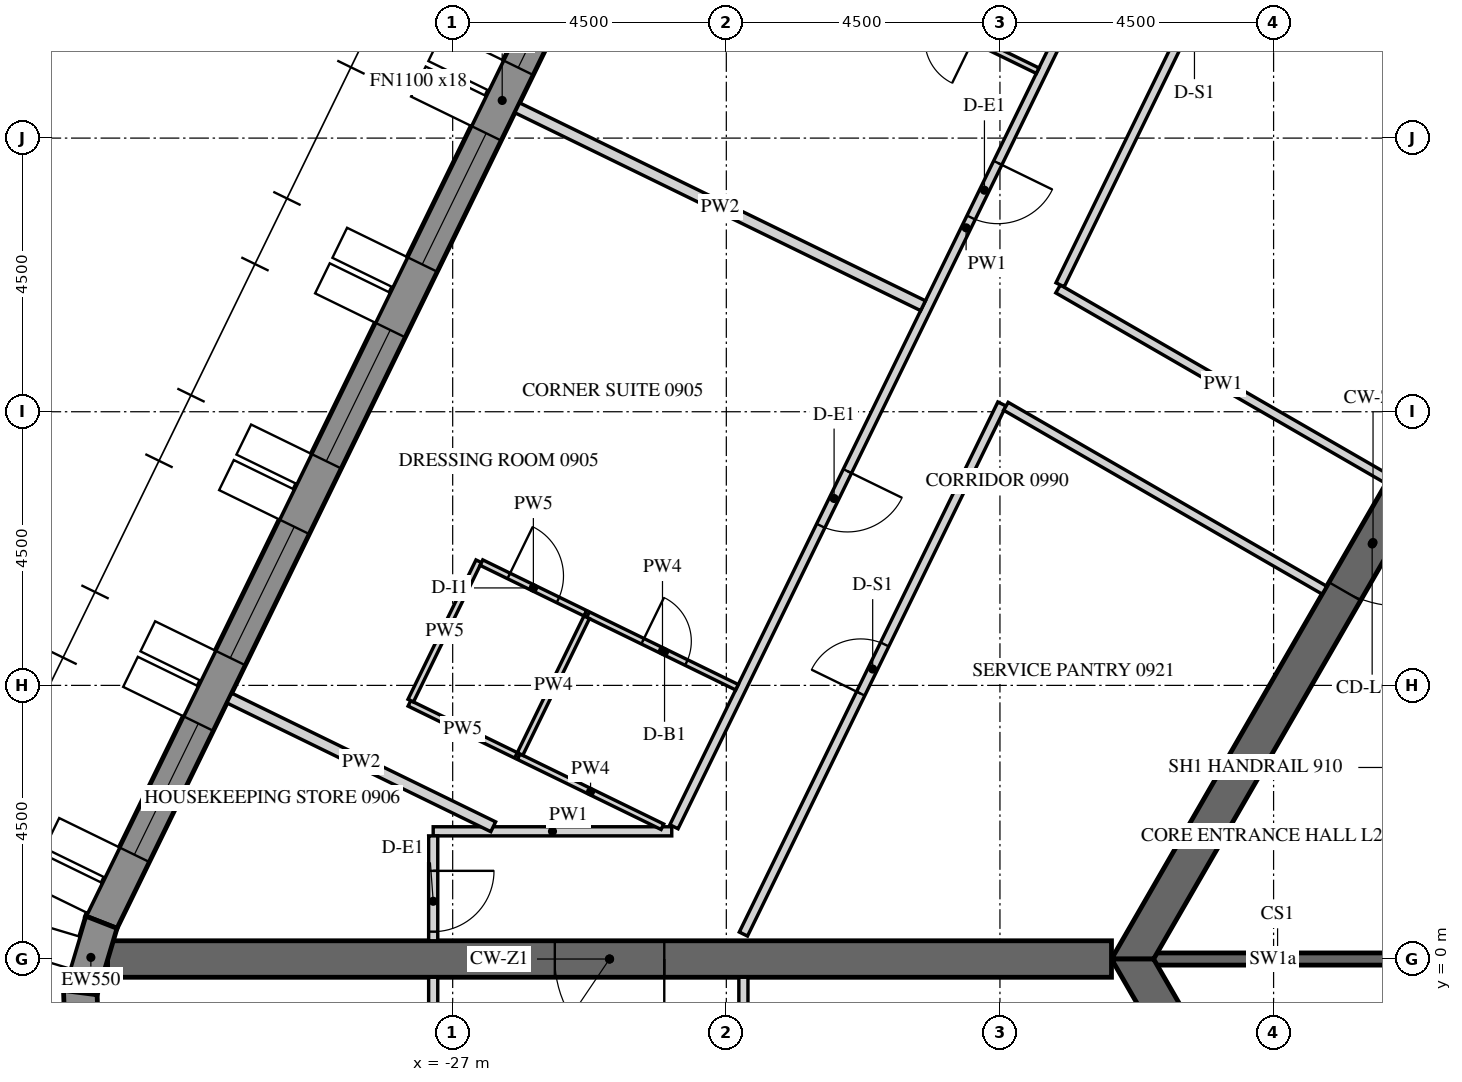
"""IFC4 building model, lengths in metres.
Left out: names, types, materials, properties, quantities, classifications, styles, units other than length and angle.
Written with IfcOpenShell. Run it as: python <this file> out.ifc"""

import sys

from ifc_helpers import new_model, si_unit, direction, frame, frame_2d, origin, place, context, subcontext, project, spatial, polyline, rectangle, outline, extrude, element, fill, save


model = new_model("IFC4")
c1 = context("Model", 3, precision=1e-05, world=origin(), true_north=direction((0.0, 1.0)))
c2 = subcontext(c1, "Body", "Model", "MODEL_VIEW")
j1 = project(units=[si_unit("LENGTHUNIT", "METRE"), si_unit("PLANEANGLEUNIT", "RADIAN")], contexts=[c1])
p1 = place(None, origin())
s1 = spatial("IfcSite", under=j1, at=p1, CompositionType="ELEMENT")
p2 = place(p1, origin())
s2 = spatial("IfcBuilding", under=s1, at=p2, CompositionType="ELEMENT")
p3 = place(p2, frame((0.0, 0.0, 123.3)))
s3 = spatial("IfcBuildingStorey", under=s2, at=p3, CompositionType="ELEMENT", Elevation=123.3)
p4 = place(p3, frame((-19.595, 27.633, -0.15), z_axis=(0.0, 0.0, 1.0), x_axis=(-0.438368285794, -0.898795441694, 0.0)))
e1 = element("IfcWall", 1, at=p4, inside=s3, PredefinedType="SOLIDWALL", context=c2, shape_type="SweptSolid", body=[
    extrude(outline(polyline([(-0.026, -0.275), (30.093, -0.275), (30.048, 0.275), (0.026, 0.275), (-0.026, -0.275)])), origin(), (0.0, 0.0, 1.0), 3.9),
])
p5 = place(p4, frame((1.236, 0.0, 1.05)))
e2 = element("IfcOpeningElement", 2, at=p5, cuts=e1, PredefinedType="OPENING", context=c2, shape_type="SweptSolid", body=[
    extrude(rectangle(XDim=2.4, YDim=2.4, at=frame_2d((1.2, 1.2))), frame((0.0, 0.285, 0.0), z_axis=(0.0, -1.0, 0.0), x_axis=(1.0, 0.0, 0.0)), (0.0, 0.0, 1.0), 0.57),
])
p6 = place(p4, frame((4.835, 0.0, 1.05)))
e3 = element("IfcOpeningElement", 3, at=p6, cuts=e1, PredefinedType="OPENING", context=c2, shape_type="SweptSolid", body=[
    extrude(rectangle(XDim=2.4, YDim=2.4, at=frame_2d((1.2, 1.2))), frame((0.0, 0.285, 0.0), z_axis=(0.0, -1.0, 0.0), x_axis=(1.0, 0.0, 0.0)), (0.0, 0.0, 1.0), 0.57),
])
p7 = place(p4, frame((8.436, 0.0, 1.05)))
e4 = element("IfcOpeningElement", 4, at=p7, cuts=e1, PredefinedType="OPENING", context=c2, shape_type="SweptSolid", body=[
    extrude(rectangle(XDim=2.4, YDim=2.4, at=frame_2d((1.2, 1.2))), frame((0.0, 0.285, 0.0), z_axis=(0.0, -1.0, 0.0), x_axis=(1.0, 0.0, 0.0)), (0.0, 0.0, 1.0), 0.57),
])
p8 = place(p4, frame((12.035, 0.0, 1.05)))
e5 = element("IfcOpeningElement", 5, at=p8, cuts=e1, PredefinedType="OPENING", context=c2, shape_type="SweptSolid", body=[
    extrude(rectangle(XDim=2.4, YDim=2.4, at=frame_2d((1.2, 1.2))), frame((0.0, 0.285, 0.0), z_axis=(0.0, -1.0, 0.0), x_axis=(1.0, 0.0, 0.0)), (0.0, 0.0, 1.0), 0.57),
])
p9 = place(p4, frame((15.635, 0.0, 1.05)))
e6 = element("IfcOpeningElement", 6, at=p9, cuts=e1, PredefinedType="OPENING", context=c2, shape_type="SweptSolid", body=[
    extrude(rectangle(XDim=2.4, YDim=2.4, at=frame_2d((1.2, 1.2))), frame((0.0, 0.285, 0.0), z_axis=(0.0, -1.0, 0.0), x_axis=(1.0, 0.0, 0.0)), (0.0, 0.0, 1.0), 0.57),
])
p10 = place(p4, frame((19.236, 0.0, 1.05)))
e7 = element("IfcOpeningElement", 7, at=p10, cuts=e1, PredefinedType="OPENING", context=c2, shape_type="SweptSolid", body=[
    extrude(rectangle(XDim=2.4, YDim=2.4, at=frame_2d((1.2, 1.2))), frame((0.0, 0.285, 0.0), z_axis=(0.0, -1.0, 0.0), x_axis=(1.0, 0.0, 0.0)), (0.0, 0.0, 1.0), 0.57),
])
p11 = place(p4, frame((22.835, 0.0, 1.05)))
e8 = element("IfcOpeningElement", 8, at=p11, cuts=e1, PredefinedType="OPENING", context=c2, shape_type="SweptSolid", body=[
    extrude(rectangle(XDim=2.4, YDim=2.4, at=frame_2d((1.2, 1.2))), frame((0.0, 0.285, 0.0), z_axis=(0.0, -1.0, 0.0), x_axis=(1.0, 0.0, 0.0)), (0.0, 0.0, 1.0), 0.57),
])
p12 = place(p4, frame((26.436, 0.0, 1.05)))
e9 = element("IfcOpeningElement", 9, at=p12, cuts=e1, PredefinedType="OPENING", context=c2, shape_type="SweptSolid", body=[
    extrude(rectangle(XDim=2.4, YDim=2.4, at=frame_2d((1.2, 1.2))), frame((0.0, 0.285, 0.0), z_axis=(0.0, -1.0, 0.0), x_axis=(1.0, 0.0, 0.0)), (0.0, 0.0, 1.0), 0.57),
])
p13 = place(p3, frame((-32.777, 0.605, -0.15), z_axis=(0.0, 0.0, 1.0), x_axis=(-0.286921497463, -0.957954098219, 0.0)))
e10 = element("IfcWall", 10, at=p13, inside=s3, PredefinedType="SOLIDWALL", context=c2, shape_type="SweptSolid", body=[
    extrude(outline(polyline([(-0.022, -0.275), (1.253, -0.275), (1.163, 0.275), (0.022, 0.275), (-0.022, -0.275)])), origin(), (0.0, 0.0, 1.0), 3.9),
])
p14 = place(p3, frame((-33.124, -0.552, -0.15), z_axis=(0.0, 0.0, 1.0), x_axis=(0.03495638276, -0.999388838893, 0.0)))
e11 = element("IfcWall", 11, at=p14, inside=s3, PredefinedType="SOLIDWALL", context=c2, shape_type="SweptSolid", body=[
    extrude(outline(polyline([(-0.045, -0.275), (1.253, -0.275), (1.163, 0.275), (0.045, 0.275), (-0.045, -0.275)])), origin(), (0.0, 0.0, 1.0), 3.9),
])
p15 = place(p3, frame((-7.91, 13.7, -0.15), z_axis=(0.0, 0.0, 1.0), x_axis=(-0.499999880136, -0.866025472988, 0.0)))
e12 = element("IfcWall", 12, at=p15, inside=s3, PredefinedType="SHEAR", context=c2, shape_type="SweptSolid", body=[
    extrude(outline(polyline([(-0.173, -0.3), (15.993, -0.3), (15.646, 0.3), (0.173, 0.3), (-0.173, -0.3)])), origin(), (0.0, 0.0, 1.0), 3.9),
])
p16 = place(p15, frame((7.039, 0.0, 0.15)))
e13 = element("IfcOpeningElement", 13, at=p16, cuts=e12, PredefinedType="OPENING", context=c2, shape_type="SweptSolid", body=[
    extrude(rectangle(XDim=1.8, YDim=2.4, at=frame_2d((0.9, 1.2))), frame((0.0, 0.31, 0.0), z_axis=(0.0, -1.0, 0.0), x_axis=(1.0, 0.0, 0.0)), (0.0, 0.0, 1.0), 0.62),
])
p17 = place(p3, frame((-15.819, 0.0, -0.15), z_axis=(0.0, 0.0, 1.0), x_axis=(0.499999880136, -0.866025472988, 0.0)))
e14 = element("IfcWall", 14, at=p17, inside=s3, PredefinedType="SHEAR", context=c2, shape_type="SweptSolid", body=[
    extrude(outline(polyline([(-0.173, -0.3), (15.993, -0.3), (15.646, 0.3), (0.173, 0.3), (-0.173, -0.3)])), origin(), (0.0, 0.0, 1.0), 3.9),
])
p18 = place(p17, frame((6.981, 0.0, 0.15)))
e15 = element("IfcOpeningElement", 15, at=p18, cuts=e14, PredefinedType="OPENING", context=c2, shape_type="SweptSolid", body=[
    extrude(rectangle(XDim=1.8, YDim=2.4, at=frame_2d((0.9, 1.2))), frame((0.0, 0.31, 0.0), z_axis=(0.0, -1.0, 0.0), x_axis=(1.0, 0.0, 0.0)), (0.0, 0.0, 1.0), 0.62),
])
p19 = place(p3, frame((-16.166, 0.0, -0.15), z_axis=(0.0, 0.0, 1.0), x_axis=(-1.0, 0.0, 0.0)))
e16 = element("IfcWall", 16, at=p19, inside=s3, PredefinedType="SHEAR", context=c2, shape_type="SweptSolid", body=[
    extrude(rectangle(XDim=16.509, YDim=0.6, at=frame_2d((8.254, 0.0))), origin(), (0.0, 0.0, 1.0), 3.9),
])
p20 = place(p19, frame((7.354, 0.0, 0.15)))
e17 = element("IfcOpeningElement", 17, at=p20, cuts=e16, PredefinedType="OPENING", context=c2, shape_type="SweptSolid", body=[
    extrude(rectangle(XDim=1.8, YDim=2.4, at=frame_2d((0.9, 1.2))), frame((0.0, 0.31, 0.0), z_axis=(0.0, -1.0, 0.0), x_axis=(1.0, 0.0, 0.0)), (0.0, 0.0, 1.0), 0.62),
])
p21 = place(p3, frame((-11.547, 0.0, -0.15), z_axis=(0.0, 0.0, 1.0), x_axis=(-1.0, 0.0, 0.0)))
e18 = element("IfcWall", 18, at=p21, inside=s3, PredefinedType="SHEAR", context=c2, shape_type="SweptSolid", body=[
    extrude(rectangle(XDim=3.926, YDim=0.2, at=frame_2d((1.963, 0.0))), origin(), (0.0, 0.0, 1.0), 3.9),
])
p22 = place(p3, frame((-13.752, 21.875, 0.0), z_axis=(0.0, 0.0, 1.0), x_axis=(-0.438374473378, -0.898792423806, 0.0)))
e19 = element("IfcWall", 19, at=p22, inside=s3, PredefinedType="PARTITIONING", context=c2, shape_type="SweptSolid", body=[
    extrude(rectangle(XDim=21.918, YDim=0.15, at=frame_2d((10.959, 0.0))), origin(), (0.0, 0.0, 1.0), 2.988),
])
p23 = place(p22, frame((9.771, 0.0, 0.0)))
e20 = element("IfcOpeningElement", 20, at=p23, cuts=e19, PredefinedType="OPENING", context=c2, shape_type="SweptSolid", body=[
    extrude(rectangle(XDim=1.0, YDim=2.1, at=frame_2d((0.5, 1.05))), frame((0.0, 0.085, 0.0), z_axis=(0.0, -1.0, 0.0), x_axis=(1.0, 0.0, 0.0)), (0.0, 0.0, 1.0), 0.17),
])
p24 = place(p22, frame((15.412, 0.0, 0.0)))
e21 = element("IfcOpeningElement", 21, at=p24, cuts=e19, PredefinedType="OPENING", context=c2, shape_type="SweptSolid", body=[
    extrude(rectangle(XDim=1.0, YDim=2.1, at=frame_2d((0.5, 1.05))), frame((0.0, 0.085, 0.0), z_axis=(0.0, -1.0, 0.0), x_axis=(1.0, 0.0, 0.0)), (0.0, 0.0, 1.0), 0.17),
])
p25 = place(p3, frame((-23.397, 2.1, 0.0), z_axis=(0.0, 0.0, 1.0), x_axis=(-1.0, 0.0, 0.0)))
e22 = element("IfcWall", 22, at=p25, inside=s3, PredefinedType="PARTITIONING", context=c2, shape_type="SweptSolid", body=[
    extrude(rectangle(XDim=3.923, YDim=0.15, at=frame_2d((1.961, 0.0))), origin(), (0.0, 0.0, 1.0), 2.988),
])
p26 = place(p3, frame((-27.32, 2.025, 0.0), z_axis=(0.0, 0.0, 1.0), x_axis=(0.0, -1.0, 0.0)))
e23 = element("IfcWall", 23, at=p26, inside=s3, PredefinedType="PARTITIONING", context=c2, shape_type="SweptSolid", body=[
    extrude(rectangle(XDim=1.725, YDim=0.15, at=frame_2d((0.862, 0.0))), origin(), (0.0, 0.0, 1.0), 2.988),
])
p27 = place(p26, frame((0.575, 0.0, 0.0)))
e24 = element("IfcOpeningElement", 24, at=p27, cuts=e23, PredefinedType="OPENING", context=c2, shape_type="SweptSolid", body=[
    extrude(rectangle(XDim=1.0, YDim=2.1, at=frame_2d((0.5, 1.05))), frame((0.0, 0.085, 0.0), z_axis=(0.0, -1.0, 0.0), x_axis=(1.0, 0.0, 0.0)), (0.0, 0.0, 1.0), 0.17),
])
p28 = place(p3, frame((-11.614, 7.884, 0.0), z_axis=(0.0, 0.0, 1.0), x_axis=(-0.866025438137, 0.4999999405, 0.0)))
e25 = element("IfcWall", 25, at=p28, inside=s3, PredefinedType="PARTITIONING", context=c2, shape_type="SweptSolid", body=[
    extrude(rectangle(XDim=6.271, YDim=0.15, at=frame_2d((3.135, 0.0))), origin(), (0.0, 0.0, 1.0), 2.988),
])
p29 = place(p3, frame((-17.011, 11.087, 0.0), z_axis=(0.0, 0.0, 1.0), x_axis=(0.43836877185, 0.898795204631, 0.0)))
e26 = element("IfcWall", 26, at=p29, inside=s3, PredefinedType="PARTITIONING", context=c2, shape_type="SweptSolid", body=[
    extrude(rectangle(XDim=10.083, YDim=0.15, at=frame_2d((5.042, 0.0))), origin(), (0.0, 0.0, 1.0), 2.988),
])
p30 = place(p29, frame((4.592, 0.0, 0.0)))
e27 = element("IfcOpeningElement", 27, at=p30, cuts=e26, PredefinedType="OPENING", context=c2, shape_type="SweptSolid", body=[
    extrude(rectangle(XDim=0.9, YDim=2.1, at=frame_2d((0.45, 1.05))), frame((0.0, 0.085, 0.0), z_axis=(0.0, -1.0, 0.0), x_axis=(1.0, 0.0, 0.0)), (0.0, 0.0, 1.0), 0.17),
])
p31 = place(p3, frame((-22.219, 0.41, 0.0), z_axis=(0.0, 0.0, 1.0), x_axis=(0.438391891827, 0.898783927972, 0.0)))
e28 = element("IfcWall", 28, at=p31, inside=s3, PredefinedType="PARTITIONING", context=c2, shape_type="SweptSolid", body=[
    extrude(rectangle(XDim=9.699, YDim=0.15, at=frame_2d((4.85, 0.0))), origin(), (0.0, 0.0, 1.0), 2.988),
])
p32 = place(p31, frame((4.4, 0.0, 0.0)))
e29 = element("IfcOpeningElement", 29, at=p32, cuts=e28, PredefinedType="OPENING", context=c2, shape_type="SweptSolid", body=[
    extrude(rectangle(XDim=0.9, YDim=2.1, at=frame_2d((0.45, 1.05))), frame((0.0, 0.085, 0.0), z_axis=(0.0, -1.0, 0.0), x_axis=(1.0, 0.0, 0.0)), (0.0, 0.0, 1.0), 0.17),
])
p33 = place(p3, frame((-17.902, 9.09, 0.0), z_axis=(0.0, 0.0, 1.0), x_axis=(0.866036368755, -0.499981007633, 0.0)))
e30 = element("IfcWall", 30, at=p33, inside=s3, PredefinedType="PARTITIONING", context=c2, shape_type="SweptSolid", body=[
    extrude(rectangle(XDim=6.049, YDim=0.15, at=frame_2d((3.024, 0.0))), origin(), (0.0, 0.0, 1.0), 2.988),
])
p34 = place(p3, frame((-27.32, -0.3, 0.0), z_axis=(0.0, 0.0, 1.0), x_axis=(0.0, -1.0, 0.0)))
e31 = element("IfcWall", 31, at=p34, inside=s3, PredefinedType="PARTITIONING", context=c2, shape_type="SweptSolid", body=[
    extrude(rectangle(XDim=1.8, YDim=0.15, at=frame_2d((0.9, 0.0))), origin(), (0.0, 0.0, 1.0), 2.988),
])
p35 = place(p3, frame((-22.219, -1.666, 0.0), z_axis=(0.0, 0.0, 1.0), x_axis=(0.0, 1.0, 0.0)))
e32 = element("IfcWall", 32, at=p35, inside=s3, PredefinedType="PARTITIONING", context=c2, shape_type="SweptSolid", body=[
    extrude(rectangle(XDim=1.366, YDim=0.15, at=frame_2d((0.683, 0.0))), origin(), (0.0, 0.0, 1.0), 2.988),
])
p36 = place(p3, frame((-17.38, 14.608, 0.0), z_axis=(0.0, 0.0, 1.0), x_axis=(-0.898790906006, 0.438377585285, 0.0)))
e33 = element("IfcWall", 33, at=p36, inside=s3, PredefinedType="PARTITIONING", context=c2, shape_type="SweptSolid", body=[
    extrude(rectangle(XDim=2.925, YDim=0.1, at=frame_2d((1.462, 0.0))), origin(), (0.0, 0.0, 1.0), 2.988),
])
p37 = place(p36, frame((1.175, 0.0, 0.0)))
e34 = element("IfcOpeningElement", 34, at=p37, cuts=e33, PredefinedType="OPENING", context=c2, shape_type="SweptSolid", body=[
    extrude(rectangle(XDim=0.8, YDim=2.1, at=frame_2d((0.4, 1.05))), frame((0.0, 0.06, 0.0), z_axis=(0.0, -1.0, 0.0), x_axis=(1.0, 0.0, 0.0)), (0.0, 0.0, 1.0), 0.12),
])
p38 = place(p3, frame((-25.938, 13.999, 0.0), z_axis=(0.0, 0.0, 1.0), x_axis=(0.898789933843, -0.438379578473, 0.0)))
e35 = element("IfcWall", 35, at=p38, inside=s3, PredefinedType="PARTITIONING", context=c2, shape_type="SweptSolid", body=[
    extrude(rectangle(XDim=7.425, YDim=0.18, at=frame_2d((3.712, 0.0))), origin(), (0.0, 0.0, 1.0), 2.988),
])
p39 = place(p3, frame((-23.551, 2.175, 0.0), z_axis=(0.0, 0.0, 1.0), x_axis=(-0.898821988063, 0.438313853049, 0.0)))
e36 = element("IfcWall", 36, at=p39, inside=s3, PredefinedType="PARTITIONING", context=c2, shape_type="SweptSolid", body=[
    extrude(rectangle(XDim=2.629, YDim=0.1, at=frame_2d((1.314, 0.0))), origin(), (0.0, 0.0, 1.0), 2.988),
])
p40 = place(p3, frame((-24.774, 5.664, 0.0), z_axis=(0.0, 0.0, 1.0), x_axis=(0.898791692788, -0.43837597217, 0.0)))
e37 = element("IfcWall", 37, at=p40, inside=s3, PredefinedType="PARTITIONING", context=c2, shape_type="SweptSolid", body=[
    extrude(rectangle(XDim=2.725, YDim=0.1, at=frame_2d((1.363, 0.0))), origin(), (0.0, 0.0, 1.0), 2.988),
])
p41 = place(p40, frame((1.0, 0.0, 0.0)))
e38 = element("IfcOpeningElement", 38, at=p41, cuts=e37, PredefinedType="OPENING", context=c2, shape_type="SweptSolid", body=[
    extrude(rectangle(XDim=0.8, YDim=2.1, at=frame_2d((0.4, 1.05))), frame((0.0, 0.06, 0.0), z_axis=(0.0, -1.0, 0.0), x_axis=(1.0, 0.0, 0.0)), (0.0, 0.0, 1.0), 0.12),
])
p42 = place(p3, frame((-25.959, 3.349, 0.0), z_axis=(0.0, 0.0, 1.0), x_axis=(-0.898815368173, 0.438327427772, 0.0)))
e39 = element("IfcWall", 39, at=p42, inside=s3, PredefinedType="PARTITIONING", context=c2, shape_type="SweptSolid", body=[
    extrude(rectangle(XDim=1.95, YDim=0.1, at=frame_2d((0.975, 0.0))), origin(), (0.0, 0.0, 1.0), 2.988),
])
p43 = place(p3, frame((-27.69, 4.249, 0.0), z_axis=(0.0, 0.0, 1.0), x_axis=(0.438384020656, 0.898787767181, 0.0)))
e40 = element("IfcWall", 40, at=p43, inside=s3, PredefinedType="PARTITIONING", context=c2, shape_type="SweptSolid", body=[
    extrude(rectangle(XDim=2.55, YDim=0.1, at=frame_2d((1.275, 0.0))), origin(), (0.0, 0.0, 1.0), 2.988),
])
p44 = place(p3, frame((-26.527, 6.519, 0.0), z_axis=(0.0, 0.0, 1.0), x_axis=(0.898828949337, -0.438299577725, 0.0)))
e41 = element("IfcWall", 41, at=p44, inside=s3, PredefinedType="PARTITIONING", context=c2, shape_type="SweptSolid", body=[
    extrude(rectangle(XDim=1.9, YDim=0.1, at=frame_2d((0.95, 0.0))), origin(), (0.0, 0.0, 1.0), 2.988),
])
p45 = place(p44, frame((0.5, 0.0, 0.0)))
e42 = element("IfcOpeningElement", 42, at=p45, cuts=e41, PredefinedType="OPENING", context=c2, shape_type="SweptSolid", body=[
    extrude(rectangle(XDim=0.9, YDim=2.1, at=frame_2d((0.45, 1.05))), frame((0.0, 0.06, 0.0), z_axis=(0.0, -1.0, 0.0), x_axis=(1.0, 0.0, 0.0)), (0.0, 0.0, 1.0), 0.12),
])
p46 = place(p3, frame((-30.673, 4.292, 0.0), z_axis=(0.0, 0.0, 1.0), x_axis=(0.898812662672, -0.438332975512, 0.0)))
e43 = element("IfcWall", 43, at=p46, inside=s3, PredefinedType="PARTITIONING", context=c2, shape_type="SweptSolid", body=[
    extrude(rectangle(XDim=4.828, YDim=0.18, at=frame_2d((2.414, 0.0))), origin(), (0.0, 0.0, 1.0), 2.988),
])
p47 = place(p3, frame((-24.796, 5.619, 0.0), z_axis=(0.0, 0.0, 1.0), x_axis=(-0.438363988158, -0.898797537761, 0.0)))
e44 = element("IfcWall", 44, at=p47, inside=s3, PredefinedType="PARTITIONING", context=c2, shape_type="SweptSolid", body=[
    extrude(rectangle(XDim=2.5, YDim=0.1, at=frame_2d((1.25, 0.0))), origin(), (0.0, 0.0, 1.0), 2.988),
])
p48 = place(p8, frame((0.0, 0.205, 0.0)))
e45 = element("IfcWindow", 45, at=p48, inside=s3, PartitioningType="DOUBLE_PANEL_VERTICAL", PredefinedType="WINDOW", context=c2, shape_type="SweptSolid", body=[
    extrude(rectangle(XDim=2.4, YDim=2.4, at=frame_2d((1.2, 1.2))), frame((0.0, 0.03, 0.0), z_axis=(0.0, -1.0, 0.0), x_axis=(1.0, 0.0, 0.0)), (0.0, 0.0, 1.0), 0.06),
])
fill(e5, e45)
p49 = place(p9, frame((0.0, 0.205, 0.0)))
e46 = element("IfcWindow", 46, at=p49, inside=s3, PartitioningType="DOUBLE_PANEL_VERTICAL", PredefinedType="WINDOW", context=c2, shape_type="SweptSolid", body=[
    extrude(rectangle(XDim=2.4, YDim=2.4, at=frame_2d((1.2, 1.2))), frame((0.0, 0.03, 0.0), z_axis=(0.0, -1.0, 0.0), x_axis=(1.0, 0.0, 0.0)), (0.0, 0.0, 1.0), 0.06),
])
fill(e6, e46)
p50 = place(p10, frame((0.0, 0.205, 0.0)))
e47 = element("IfcWindow", 47, at=p50, inside=s3, PartitioningType="DOUBLE_PANEL_VERTICAL", PredefinedType="WINDOW", context=c2, shape_type="SweptSolid", body=[
    extrude(rectangle(XDim=2.4, YDim=2.4, at=frame_2d((1.2, 1.2))), frame((0.0, 0.03, 0.0), z_axis=(0.0, -1.0, 0.0), x_axis=(1.0, 0.0, 0.0)), (0.0, 0.0, 1.0), 0.06),
])
fill(e7, e47)
p51 = place(p11, frame((0.0, 0.205, 0.0)))
e48 = element("IfcWindow", 48, at=p51, inside=s3, PartitioningType="DOUBLE_PANEL_VERTICAL", PredefinedType="WINDOW", context=c2, shape_type="SweptSolid", body=[
    extrude(rectangle(XDim=2.4, YDim=2.4, at=frame_2d((1.2, 1.2))), frame((0.0, 0.03, 0.0), z_axis=(0.0, -1.0, 0.0), x_axis=(1.0, 0.0, 0.0)), (0.0, 0.0, 1.0), 0.06),
])
fill(e8, e48)
p52 = place(p12, frame((0.0, 0.205, 0.0)))
e49 = element("IfcWindow", 49, at=p52, inside=s3, PartitioningType="DOUBLE_PANEL_VERTICAL", PredefinedType="WINDOW", context=c2, shape_type="SweptSolid", body=[
    extrude(rectangle(XDim=2.4, YDim=2.4, at=frame_2d((1.2, 1.2))), frame((0.0, 0.03, 0.0), z_axis=(0.0, -1.0, 0.0), x_axis=(1.0, 0.0, 0.0)), (0.0, 0.0, 1.0), 0.06),
])
fill(e9, e49)
p53 = place(p16, origin())
e50 = element("IfcDoor", 50, at=p53, inside=s3, OperationType="DOUBLE_DOOR_SINGLE_SWING", PredefinedType="DOOR", context=c2, shape_type="SweptSolid", body=[
    extrude(rectangle(XDim=1.8, YDim=2.4, at=frame_2d((0.9, 1.2))), frame((0.0, 0.025, 0.0), z_axis=(0.0, -1.0, 0.0), x_axis=(1.0, 0.0, 0.0)), (0.0, 0.0, 1.0), 0.05),
])
fill(e13, e50)
p54 = place(p20, origin())
e51 = element("IfcDoor", 51, at=p54, inside=s3, OperationType="DOUBLE_DOOR_SINGLE_SWING", PredefinedType="DOOR", context=c2, shape_type="SweptSolid", body=[
    extrude(rectangle(XDim=1.8, YDim=2.4, at=frame_2d((0.9, 1.2))), frame((0.0, 0.025, 0.0), z_axis=(0.0, -1.0, 0.0), x_axis=(1.0, 0.0, 0.0)), (0.0, 0.0, 1.0), 0.05),
])
fill(e17, e51)
p55 = place(p23, origin())
e52 = element("IfcDoor", 52, at=p55, inside=s3, OperationType="SINGLE_SWING_RIGHT", PredefinedType="DOOR", context=c2, shape_type="SweptSolid", body=[
    extrude(rectangle(XDim=1.0, YDim=2.1, at=frame_2d((0.5, 1.05))), frame((0.0, 0.025, 0.0), z_axis=(0.0, -1.0, 0.0), x_axis=(1.0, 0.0, 0.0)), (0.0, 0.0, 1.0), 0.05),
])
fill(e20, e52)
p56 = place(p24, origin())
e53 = element("IfcDoor", 53, at=p56, inside=s3, OperationType="SINGLE_SWING_LEFT", PredefinedType="DOOR", context=c2, shape_type="SweptSolid", body=[
    extrude(rectangle(XDim=1.0, YDim=2.1, at=frame_2d((0.5, 1.05))), frame((0.0, 0.025, 0.0), z_axis=(0.0, -1.0, 0.0), x_axis=(1.0, 0.0, 0.0)), (0.0, 0.0, 1.0), 0.05),
])
fill(e21, e53)
p57 = place(p41, origin())
e54 = element("IfcDoor", 54, at=p57, inside=s3, OperationType="SINGLE_SWING_LEFT", PredefinedType="DOOR", context=c2, shape_type="SweptSolid", body=[
    extrude(rectangle(XDim=0.8, YDim=2.1, at=frame_2d((0.4, 1.05))), frame((0.0, 0.025, 0.0), z_axis=(0.0, -1.0, 0.0), x_axis=(1.0, 0.0, 0.0)), (0.0, 0.0, 1.0), 0.05),
])
fill(e38, e54)
p58 = place(p45, origin())
e55 = element("IfcDoor", 55, at=p58, inside=s3, OperationType="SINGLE_SWING_RIGHT", PredefinedType="DOOR", context=c2, shape_type="SweptSolid", body=[
    extrude(rectangle(XDim=0.9, YDim=2.1, at=frame_2d((0.45, 1.05))), frame((0.0, 0.025, 0.0), z_axis=(0.0, -1.0, 0.0), x_axis=(1.0, 0.0, 0.0)), (0.0, 0.0, 1.0), 0.05),
])
fill(e42, e55)
p59 = place(p27, origin())
e56 = element("IfcDoor", 56, at=p59, inside=s3, OperationType="SINGLE_SWING_LEFT", PredefinedType="DOOR", context=c2, shape_type="SweptSolid", body=[
    extrude(rectangle(XDim=1.0, YDim=2.1, at=frame_2d((0.5, 1.05))), frame((0.0, 0.025, 0.0), z_axis=(0.0, -1.0, 0.0), x_axis=(1.0, 0.0, 0.0)), (0.0, 0.0, 1.0), 0.05),
])
fill(e24, e56)
p60 = place(p32, origin())
e57 = element("IfcDoor", 57, at=p60, inside=s3, OperationType="SINGLE_SWING_LEFT", PredefinedType="DOOR", context=c2, shape_type="SweptSolid", body=[
    extrude(rectangle(XDim=0.9, YDim=2.1, at=frame_2d((0.45, 1.05))), frame((0.0, 0.025, 0.0), z_axis=(0.0, -1.0, 0.0), x_axis=(1.0, 0.0, 0.0)), (0.0, 0.0, 1.0), 0.05),
])
fill(e29, e57)
save(model, sys.argv[1])
